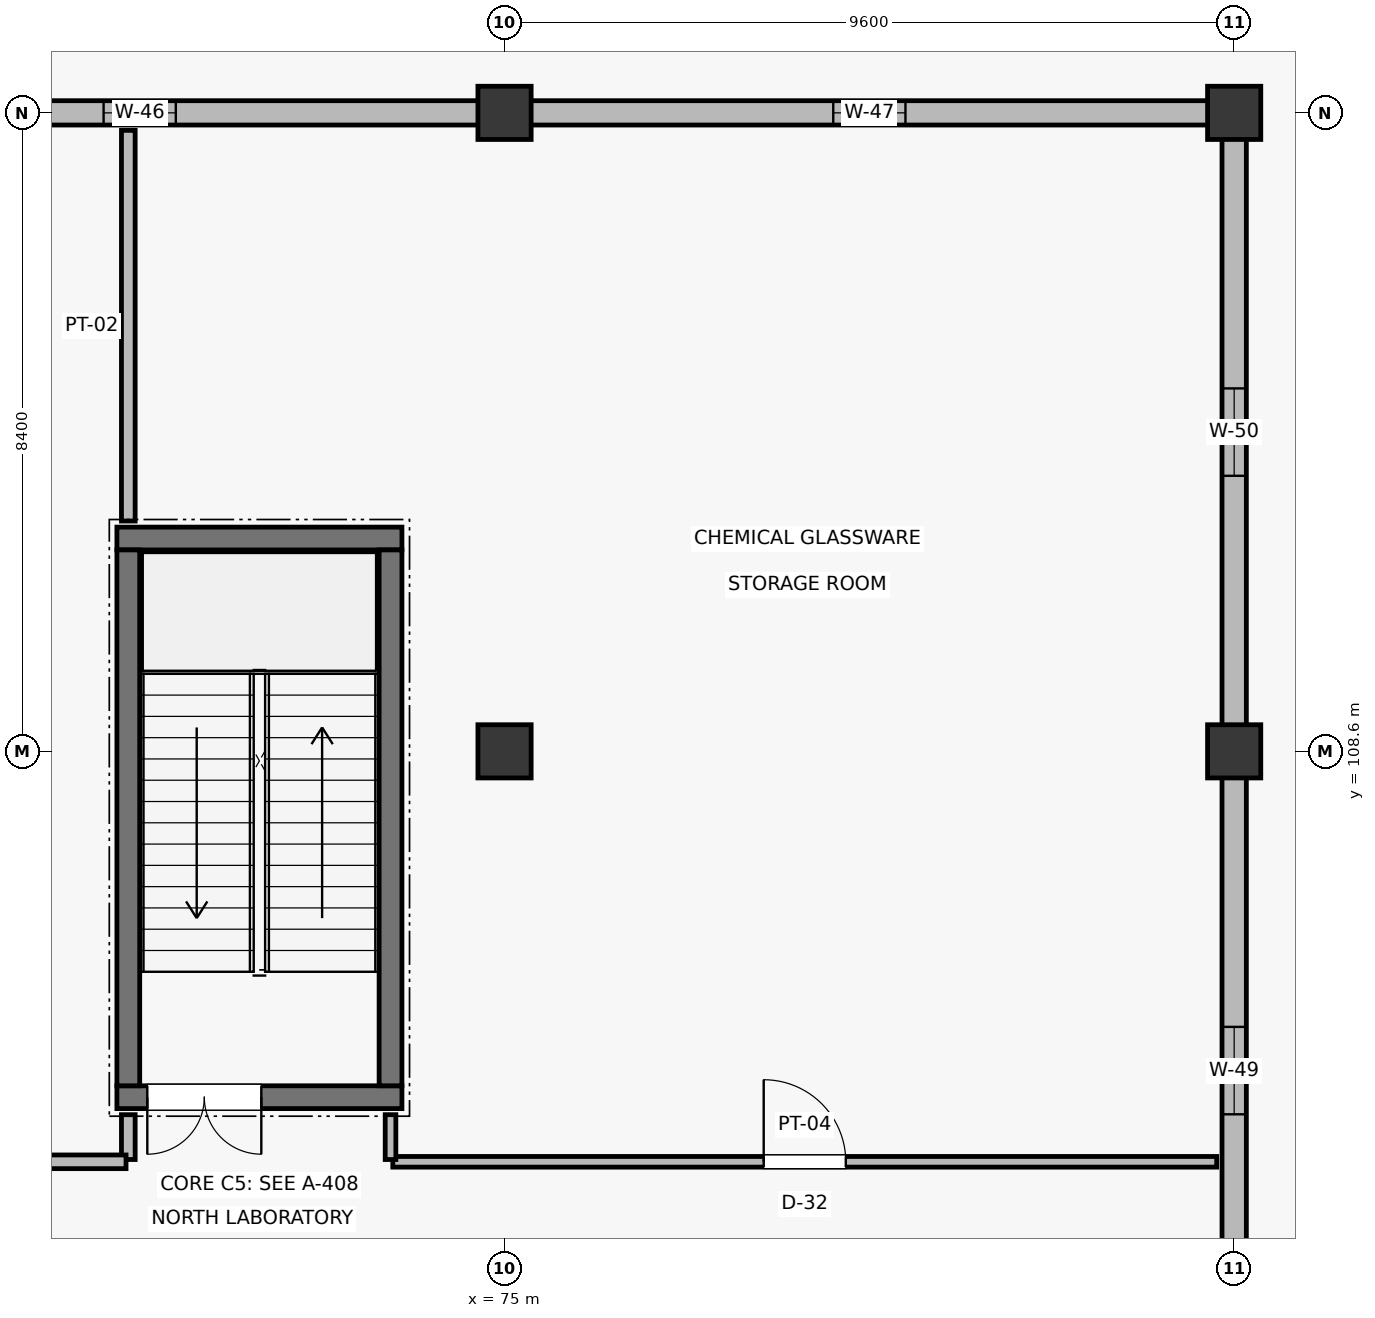
"""IFC4 building model, lengths in metres.
Left out: names, types, materials, properties, quantities, classifications, styles, units other than length and angle.
Written with IfcOpenShell. Run it as: python <this file> out.ifc"""

import sys

from ifc_helpers import new_model, si_unit, direction, frame, frame_2d, origin, origin_2d, place, context, subcontext, project, spatial, rectangle, extrude, element, fill, save


model = new_model("IFC4")
c1 = context("Model", 3, precision=1e-05, world=origin(), true_north=direction((0.0, 1.0)))
c2 = subcontext(c1, "Body", "Model", "MODEL_VIEW")
j1 = project(units=[si_unit("LENGTHUNIT", "METRE"), si_unit("PLANEANGLEUNIT", "RADIAN")], contexts=[c1])
p1 = place(None, origin())
s1 = spatial("IfcSite", under=j1, at=p1, CompositionType="ELEMENT")
p2 = place(p1, origin())
s2 = spatial("IfcBuilding", under=s1, at=p2, CompositionType="ELEMENT")
p3 = place(p2, origin())
s3 = spatial("IfcBuildingStorey", under=s2, at=p3, CompositionType="ELEMENT", Elevation=0.0)
for number, where, z_axis, x_axis in (
    (1, (75.0, 108.6, 0.0), (0.0, 0.0, 1.0), (1.0, 0.0, 0.0)),
    (2, (75.0, 117.0, 0.0), (0.0, 0.0, 1.0), (1.0, 0.0, 0.0)),
    (3, (84.6, 108.6, 0.0), (0.0, 0.0, 1.0), (1.0, 0.0, 0.0)),
    (4, (84.6, 117.0, 0.0), (0.0, 0.0, 1.0), (1.0, 0.0, 0.0)),
):
    element("IfcColumn", number, at=place(p3, frame(where, z_axis=z_axis, x_axis=x_axis)), inside=s3, PredefinedType="COLUMN", context=c2, shape_type="SweptSolid", body=[
        extrude(rectangle(XDim=0.7, YDim=0.7, at=origin_2d()), origin(), (0.0, 0.0, 1.0), 5.4),
    ])
p4 = place(p3, frame((65.735, 117.0, 0.0), z_axis=(0.0, 0.0, 1.0), x_axis=(1.0, 0.0, 0.0)))
e5 = element("IfcWall", 5, at=p4, inside=s3, PredefinedType="SOLIDWALL", context=c2, shape_type="SweptSolid", body=[
    extrude(rectangle(XDim=8.93, YDim=0.32, at=frame_2d((4.465, 0.0))), origin(), (0.0, 0.0, 1.0), 4.375),
])
p5 = place(p4, frame((3.99, 0.0, 0.9)))
e6 = element("IfcOpeningElement", 6, at=p5, cuts=e5, PredefinedType="OPENING", context=c2, shape_type="SweptSolid", body=[
    extrude(rectangle(XDim=0.95, YDim=1.35, at=frame_2d((0.475, 0.675))), frame((0.0, 0.17, 0.0), z_axis=(0.0, -1.0, 0.0), x_axis=(1.0, 0.0, 0.0)), (0.0, 0.0, 1.0), 0.34),
])
p6 = place(p3, frame((75.335, 117.0, 0.0), z_axis=(0.0, 0.0, 1.0), x_axis=(1.0, 0.0, 0.0)))
e7 = element("IfcWall", 7, at=p6, inside=s3, PredefinedType="SOLIDWALL", context=c2, shape_type="SweptSolid", body=[
    extrude(rectangle(XDim=8.93, YDim=0.32, at=frame_2d((4.465, 0.0))), origin(), (0.0, 0.0, 1.0), 4.375),
])
p7 = place(p6, frame((3.99, 0.0, 0.9)))
e8 = element("IfcOpeningElement", 8, at=p7, cuts=e7, PredefinedType="OPENING", context=c2, shape_type="SweptSolid", body=[
    extrude(rectangle(XDim=0.95, YDim=1.55, at=frame_2d((0.475, 0.775))), frame((0.0, 0.17, 0.0), z_axis=(0.0, -1.0, 0.0), x_axis=(1.0, 0.0, 0.0)), (0.0, 0.0, 1.0), 0.34),
])
p8 = place(p3, frame((84.6, 100.535, 0.0), z_axis=(0.0, 0.0, 1.0), x_axis=(0.0, 1.0, 0.0)))
e9 = element("IfcWall", 9, at=p8, inside=s3, PredefinedType="SOLIDWALL", context=c2, shape_type="SweptSolid", body=[
    extrude(rectangle(XDim=7.73, YDim=0.32, at=frame_2d((3.865, 0.0))), origin(), (0.0, 0.0, 1.0), 4.425),
])
p9 = place(p8, frame((3.29, 0.0, 0.9)))
e10 = element("IfcOpeningElement", 10, at=p9, cuts=e9, PredefinedType="OPENING", context=c2, shape_type="SweptSolid", body=[
    extrude(rectangle(XDim=1.15, YDim=1.15, at=frame_2d((0.575, 0.575))), frame((0.0, 0.17, 0.0), z_axis=(0.0, -1.0, 0.0), x_axis=(1.0, 0.0, 0.0)), (0.0, 0.0, 1.0), 0.34),
])
p10 = place(p3, frame((84.6, 108.935, 0.0), z_axis=(0.0, 0.0, 1.0), x_axis=(0.0, 1.0, 0.0)))
e11 = element("IfcWall", 11, at=p10, inside=s3, PredefinedType="SOLIDWALL", context=c2, shape_type="SweptSolid", body=[
    extrude(rectangle(XDim=7.73, YDim=0.32, at=frame_2d((3.865, 0.0))), origin(), (0.0, 0.0, 1.0), 4.425),
])
p11 = place(p10, frame((3.29, 0.0, 0.9)))
e12 = element("IfcOpeningElement", 12, at=p11, cuts=e11, PredefinedType="OPENING", context=c2, shape_type="SweptSolid", body=[
    extrude(rectangle(XDim=1.15, YDim=1.35, at=frame_2d((0.575, 0.675))), frame((0.0, 0.17, 0.0), z_axis=(0.0, -1.0, 0.0), x_axis=(1.0, 0.0, 0.0)), (0.0, 0.0, 1.0), 0.34),
])
p12 = place(p3, frame((69.9, 104.05, 0.0), z_axis=(0.0, 0.0, 1.0), x_axis=(1.0, 0.0, 0.0)))
e13 = element("IfcWall", 13, at=p12, inside=s3, PredefinedType="SHEAR", context=c2, shape_type="SweptSolid", body=[
    extrude(rectangle(XDim=3.75, YDim=0.3, at=frame_2d((1.875, 0.0))), origin(), (0.0, 0.0, 1.0), 5.18),
])
p13 = place(p12, frame((0.4, 0.0, 0.0)))
e14 = element("IfcOpeningElement", 14, at=p13, cuts=e13, PredefinedType="OPENING", context=c2, shape_type="SweptSolid", body=[
    extrude(rectangle(XDim=1.5, YDim=2.2, at=frame_2d((0.75, 1.1))), frame((0.0, 0.16, 0.0), z_axis=(0.0, -1.0, 0.0), x_axis=(1.0, 0.0, 0.0)), (0.0, 0.0, 1.0), 0.32),
])
p14 = place(p3, frame((69.9, 111.4, 0.0), z_axis=(0.0, 0.0, 1.0), x_axis=(1.0, 0.0, 0.0)))
e15 = element("IfcWall", 15, at=p14, inside=s3, PredefinedType="SHEAR", context=c2, shape_type="SweptSolid", body=[
    extrude(rectangle(XDim=3.75, YDim=0.3, at=frame_2d((1.875, 0.0))), origin(), (0.0, 0.0, 1.0), 5.18),
])
for number, where, z_axis, x_axis in (
    (16, (70.05, 104.2, 0.0), (0.0, 0.0, 1.0), (0.0, 1.0, 0.0)),
    (17, (73.5, 104.2, 0.0), (0.0, 0.0, 1.0), (0.0, 1.0, 0.0)),
):
    element("IfcWall", number, at=place(p3, frame(where, z_axis=z_axis, x_axis=x_axis)), inside=s3, PredefinedType="SHEAR", context=c2, shape_type="SweptSolid", body=[
        extrude(rectangle(XDim=7.05, YDim=0.3, at=frame_2d((3.525, 0.0))), origin(), (0.0, 0.0, 1.0), 5.18),
    ])
p15 = place(p3, frame((70.05, 111.63, 0.0), z_axis=(0.0, 0.0, 1.0), x_axis=(0.0, 1.0, 0.0)))
e18 = element("IfcWall", 18, at=p15, inside=s3, PredefinedType="PARTITIONING", context=c2, shape_type="SweptSolid", body=[
    extrude(rectangle(XDim=5.14, YDim=0.18, at=frame_2d((2.57, 0.0))), origin(), (0.0, 0.0, 1.0), 4.375),
])
p16 = place(p3, frame((70.05, 103.23, 0.0), z_axis=(0.0, 0.0, 1.0), x_axis=(0.0, 1.0, 0.0)))
e19 = element("IfcWall", 19, at=p16, inside=s3, PredefinedType="PARTITIONING", context=c2, shape_type="SweptSolid", body=[
    extrude(rectangle(XDim=0.59, YDim=0.18, at=frame_2d((0.295, 0.0))), origin(), (0.0, 0.0, 1.0), 5.08),
])
p17 = place(p3, frame((51.83, 103.2, 0.0), z_axis=(0.0, 0.0, 1.0), x_axis=(1.0, 0.0, 0.0)))
e20 = element("IfcWall", 20, at=p17, inside=s3, PredefinedType="PARTITIONING", context=c2, shape_type="SweptSolid", body=[
    extrude(rectangle(XDim=18.19, YDim=0.18, at=frame_2d((9.095, 0.0))), origin(), (0.0, 0.0, 1.0), 4.425),
])
p18 = place(p17, frame((8.395, 0.0, 0.0)))
e21 = element("IfcOpeningElement", 21, at=p18, cuts=e20, PredefinedType="OPENING", context=c2, shape_type="SweptSolid", body=[
    extrude(rectangle(XDim=1.4, YDim=2.2, at=frame_2d((0.7, 1.1))), frame((0.0, 0.1, 0.0), z_axis=(0.0, -1.0, 0.0), x_axis=(1.0, 0.0, 0.0)), (0.0, 0.0, 1.0), 0.2),
])
p19 = place(p3, frame((73.53, 103.2, 0.0), z_axis=(0.0, 0.0, 1.0), x_axis=(1.0, 0.0, 0.0)))
e22 = element("IfcWall", 22, at=p19, inside=s3, PredefinedType="PARTITIONING", context=c2, shape_type="SweptSolid", body=[
    extrude(rectangle(XDim=10.84, YDim=0.14, at=frame_2d((5.42, 0.0))), origin(), (0.0, 0.0, 1.0), 4.425),
])
p20 = place(p19, frame((4.88, 0.0, 0.0)))
e23 = element("IfcOpeningElement", 23, at=p20, cuts=e22, PredefinedType="OPENING", context=c2, shape_type="SweptSolid", body=[
    extrude(rectangle(XDim=1.08, YDim=2.15, at=frame_2d((0.54, 1.075))), frame((0.0, 0.08, 0.0), z_axis=(0.0, -1.0, 0.0), x_axis=(1.0, 0.0, 0.0)), (0.0, 0.0, 1.0), 0.16),
])
p21 = place(p3, frame((73.5, 103.23, 0.0), z_axis=(0.0, 0.0, 1.0), x_axis=(0.0, 1.0, 0.0)))
e24 = element("IfcWall", 24, at=p21, inside=s3, PredefinedType="PARTITIONING", context=c2, shape_type="SweptSolid", body=[
    extrude(rectangle(XDim=0.59, YDim=0.14, at=frame_2d((0.295, 0.0))), origin(), (0.0, 0.0, 1.0), 5.08),
])
p22 = place(p5, origin())
e25 = element("IfcWindow", 25, at=p22, inside=s3, PartitioningType="DOUBLE_PANEL_VERTICAL", PredefinedType="WINDOW", context=c2, shape_type="SweptSolid", body=[
    extrude(rectangle(XDim=0.95, YDim=1.35, at=frame_2d((0.475, 0.675))), frame((0.0, 0.03, 0.0), z_axis=(0.0, -1.0, 0.0), x_axis=(1.0, 0.0, 0.0)), (0.0, 0.0, 1.0), 0.06),
])
fill(e6, e25)
p23 = place(p7, origin())
e26 = element("IfcWindow", 26, at=p23, inside=s3, PartitioningType="DOUBLE_PANEL_VERTICAL", PredefinedType="WINDOW", context=c2, shape_type="SweptSolid", body=[
    extrude(rectangle(XDim=0.95, YDim=1.55, at=frame_2d((0.475, 0.775))), frame((0.0, 0.03, 0.0), z_axis=(0.0, -1.0, 0.0), x_axis=(1.0, 0.0, 0.0)), (0.0, 0.0, 1.0), 0.06),
])
fill(e8, e26)
p24 = place(p9, frame((1.15, 0.0, 0.0), z_axis=(0.0, 0.0, 1.0), x_axis=(-1.0, 0.0, 0.0)))
e27 = element("IfcWindow", 27, at=p24, inside=s3, PartitioningType="DOUBLE_PANEL_VERTICAL", PredefinedType="WINDOW", context=c2, shape_type="SweptSolid", body=[
    extrude(rectangle(XDim=1.15, YDim=1.15, at=frame_2d((0.575, 0.575))), frame((0.0, 0.03, 0.0), z_axis=(0.0, -1.0, 0.0), x_axis=(1.0, 0.0, 0.0)), (0.0, 0.0, 1.0), 0.06),
])
fill(e10, e27)
p25 = place(p11, frame((1.15, 0.0, 0.0), z_axis=(0.0, 0.0, 1.0), x_axis=(-1.0, 0.0, 0.0)))
e28 = element("IfcWindow", 28, at=p25, inside=s3, PartitioningType="DOUBLE_PANEL_VERTICAL", PredefinedType="WINDOW", context=c2, shape_type="SweptSolid", body=[
    extrude(rectangle(XDim=1.15, YDim=1.35, at=frame_2d((0.575, 0.675))), frame((0.0, 0.03, 0.0), z_axis=(0.0, -1.0, 0.0), x_axis=(1.0, 0.0, 0.0)), (0.0, 0.0, 1.0), 0.06),
])
fill(e12, e28)
p26 = place(p13, frame((1.5, 0.0, 0.0), z_axis=(0.0, 0.0, 1.0), x_axis=(-1.0, 0.0, 0.0)))
e29 = element("IfcDoor", 29, at=p26, inside=s3, OperationType="DOUBLE_DOOR_SINGLE_SWING", PredefinedType="DOOR", context=c2, shape_type="SweptSolid", body=[
    extrude(rectangle(XDim=1.5, YDim=2.2, at=frame_2d((0.75, 1.1))), frame((0.0, 0.025, 0.0), z_axis=(0.0, -1.0, 0.0), x_axis=(1.0, 0.0, 0.0)), (0.0, 0.0, 1.0), 0.05),
])
fill(e14, e29)
p27 = place(p20, origin())
e30 = element("IfcDoor", 30, at=p27, inside=s3, OperationType="SINGLE_SWING_LEFT", PredefinedType="DOOR", context=c2, shape_type="SweptSolid", body=[
    extrude(rectangle(XDim=1.08, YDim=2.15, at=frame_2d((0.54, 1.075))), frame((0.0, 0.025, 0.0), z_axis=(0.0, -1.0, 0.0), x_axis=(1.0, 0.0, 0.0)), (0.0, 0.0, 1.0), 0.05),
])
fill(e23, e30)
save(model, sys.argv[1])
